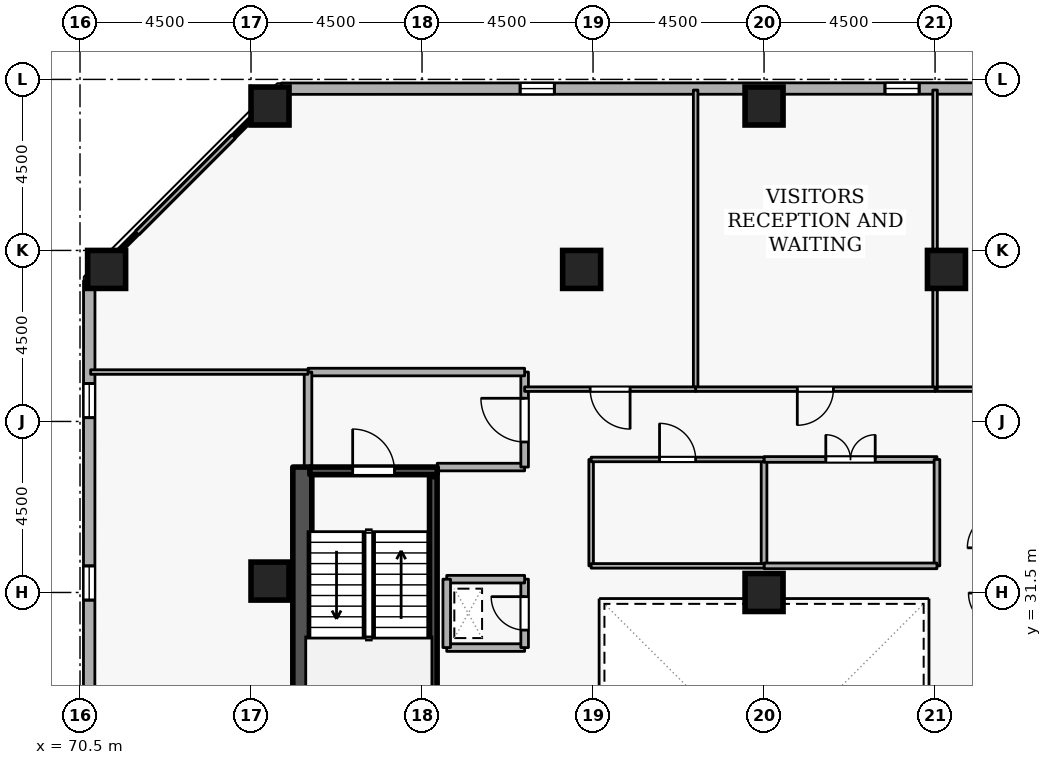
"""IFC4 building model, lengths in metres.
Left out: names, types, materials, properties, quantities, classifications, styles, units other than length and angle.
Written with IfcOpenShell. Run it as: python <this file> out.ifc"""

import sys

from ifc_helpers import new_model, si_unit, direction, frame, frame_2d, origin, origin_2d, place, context, subcontext, project, spatial, rectangle, extrude, element, fill, save


model = new_model("IFC4")
c1 = context("Model", 3, precision=1e-05, world=origin(), true_north=direction((0.0, 1.0)))
c2 = subcontext(c1, "Body", "Model", "MODEL_VIEW")
j1 = project(units=[si_unit("LENGTHUNIT", "METRE"), si_unit("PLANEANGLEUNIT", "RADIAN")], contexts=[c1])
p1 = place(None, origin())
s1 = spatial("IfcSite", under=j1, at=p1, CompositionType="ELEMENT")
p2 = place(p1, origin())
s2 = spatial("IfcBuilding", under=s1, at=p2, CompositionType="ELEMENT")
p3 = place(p2, frame((0.0, 0.0, 243.9)))
s3 = spatial("IfcBuildingStorey", under=s2, at=p3, CompositionType="ELEMENT", Elevation=243.9)
p4 = place(p3, frame((76.35, 19.2, 0.0), z_axis=(0.0, 0.0, 1.0), x_axis=(0.0, 1.0, 0.0)))
e1 = element("IfcWall", 1, at=p4, inside=s3, PredefinedType="SHEAR", context=c2, shape_type="SweptSolid", body=[
    extrude(rectangle(XDim=15.6, YDim=0.5, at=frame_2d((7.8, 0.0))), origin(), (0.0, 0.0, 1.0), 3.6),
])
for number, where, z_axis, x_axis in (
    (2, (88.5, 44.3, 0.0), (0.0, 0.0, 1.0), (1.0, 0.0, 0.0)),
    (3, (75.5, 44.3, 0.0), (0.0, 0.0, 1.0), (1.0, 0.0, 0.0)),
    (4, (71.2, 40.0, 0.0), (0.0, 0.0, 1.0), (1.0, 0.0, 0.0)),
    (5, (93.3, 40.0, 0.0), (0.0, 0.0, 1.0), (1.0, 0.0, 0.0)),
    (6, (83.7, 40.0, 0.0), (0.0, 0.0, 1.0), (1.0, 0.0, 0.0)),
    (7, (75.5, 31.8, 0.0), (0.0, 0.0, 1.0), (1.0, 0.0, 0.0)),
    (8, (88.5, 31.5, 0.0), (0.0, 0.0, 1.0), (1.0, 0.0, 0.0)),
):
    element("IfcColumn", number, at=place(p3, frame(where, z_axis=z_axis, x_axis=x_axis)), inside=s3, PredefinedType="COLUMN", context=c2, shape_type="SweptSolid", body=[
        extrude(rectangle(XDim=1.0, YDim=1.0, at=origin_2d()), origin(), (0.0, 0.0, 1.0), 3.6),
    ])
p5 = place(p3, frame((109.681, 44.765, 0.0), z_axis=(0.0, 0.0, 1.0), x_axis=(-0.999999969988, -0.000244999128, 0.0)))
e9 = element("IfcWall", 9, at=p5, inside=s3, PredefinedType="STANDARD", context=c2, shape_type="SweptSolid", body=[
    extrude(rectangle(XDim=33.881, YDim=0.3, at=frame_2d((16.94, 0.0))), origin(), (0.0, 0.0, 1.0), 2.7),
])
p6 = place(p5, frame((2.7, 0.0, 0.72)))
e10 = element("IfcOpeningElement", 10, at=p6, cuts=e9, PredefinedType="OPENING", context=c2, shape_type="SweptSolid", body=[
    extrude(rectangle(XDim=0.9, YDim=1.75, at=frame_2d((0.45, 0.875))), frame((0.0, 0.16, 0.0), z_axis=(0.0, -1.0, 0.0), x_axis=(1.0, 0.0, 0.0)), (0.0, 0.0, 1.0), 0.32),
])
p7 = place(p5, frame((12.3, 0.0, 0.72)))
e11 = element("IfcOpeningElement", 11, at=p7, cuts=e9, PredefinedType="OPENING", context=c2, shape_type="SweptSolid", body=[
    extrude(rectangle(XDim=0.9, YDim=1.75, at=frame_2d((0.45, 0.875))), frame((0.0, 0.16, 0.0), z_axis=(0.0, -1.0, 0.0), x_axis=(1.0, 0.0, 0.0)), (0.0, 0.0, 1.0), 0.32),
])
p8 = place(p5, frame((17.1, 0.0, 0.72)))
e12 = element("IfcOpeningElement", 12, at=p8, cuts=e9, PredefinedType="OPENING", context=c2, shape_type="SweptSolid", body=[
    extrude(rectangle(XDim=0.9, YDim=1.75, at=frame_2d((0.45, 0.875))), frame((0.0, 0.16, 0.0), z_axis=(0.0, -1.0, 0.0), x_axis=(1.0, 0.0, 0.0)), (0.0, 0.0, 1.0), 0.32),
])
p9 = place(p5, frame((26.7, 0.0, 0.72)))
e13 = element("IfcOpeningElement", 13, at=p9, cuts=e9, PredefinedType="OPENING", context=c2, shape_type="SweptSolid", body=[
    extrude(rectangle(XDim=0.9, YDim=1.75, at=frame_2d((0.45, 0.875))), frame((0.0, 0.16, 0.0), z_axis=(0.0, -1.0, 0.0), x_axis=(1.0, 0.0, 0.0)), (0.0, 0.0, 1.0), 0.32),
])
p10 = place(p3, frame((70.744, 39.699, 0.0), z_axis=(0.0, 0.0, 1.0), x_axis=(-0.000244999128, -0.999999969988, 0.0)))
e14 = element("IfcWall", 14, at=p10, inside=s3, PredefinedType="STANDARD", context=c2, shape_type="SweptSolid", body=[
    extrude(rectangle(XDim=33.881, YDim=0.3, at=frame_2d((16.94, 0.0))), origin(), (0.0, 0.0, 1.0), 2.7),
])
p11 = place(p10, frame((2.7, 0.0, 0.72)))
e15 = element("IfcOpeningElement", 15, at=p11, cuts=e14, PredefinedType="OPENING", context=c2, shape_type="SweptSolid", body=[
    extrude(rectangle(XDim=0.9, YDim=1.75, at=frame_2d((0.45, 0.875))), frame((0.0, 0.16, 0.0), z_axis=(0.0, -1.0, 0.0), x_axis=(1.0, 0.0, 0.0)), (0.0, 0.0, 1.0), 0.32),
])
p12 = place(p10, frame((7.5, 0.0, 0.72)))
e16 = element("IfcOpeningElement", 16, at=p12, cuts=e14, PredefinedType="OPENING", context=c2, shape_type="SweptSolid", body=[
    extrude(rectangle(XDim=0.9, YDim=1.75, at=frame_2d((0.45, 0.875))), frame((0.0, 0.16, 0.0), z_axis=(0.0, -1.0, 0.0), x_axis=(1.0, 0.0, 0.0)), (0.0, 0.0, 1.0), 0.32),
])
p13 = place(p10, frame((17.1, 0.0, 0.72)))
e17 = element("IfcOpeningElement", 17, at=p13, cuts=e14, PredefinedType="OPENING", context=c2, shape_type="SweptSolid", body=[
    extrude(rectangle(XDim=0.9, YDim=1.75, at=frame_2d((0.45, 0.875))), frame((0.0, 0.16, 0.0), z_axis=(0.0, -1.0, 0.0), x_axis=(1.0, 0.0, 0.0)), (0.0, 0.0, 1.0), 0.32),
])
p14 = place(p3, frame((76.55, 34.7, 0.0), z_axis=(0.0, 0.0, 1.0), x_axis=(1.0, 0.0, 0.0)))
e18 = element("IfcWall", 18, at=p14, inside=s3, PredefinedType="SHEAR", context=c2, shape_type="SweptSolid", body=[
    extrude(rectangle(XDim=3.35, YDim=0.2, at=frame_2d((1.675, 0.0))), origin(), (0.0, 0.0, 1.0), 3.6),
])
p15 = place(p14, frame((1.125, 0.0, 0.0)))
e19 = element("IfcOpeningElement", 19, at=p15, cuts=e18, PredefinedType="OPENING", context=c2, shape_type="SweptSolid", body=[
    extrude(rectangle(XDim=1.1, YDim=2.1, at=frame_2d((0.55, 1.05))), frame((0.0, 0.11, 0.0), z_axis=(0.0, -1.0, 0.0), x_axis=(1.0, 0.0, 0.0)), (0.0, 0.0, 1.0), 0.22),
])
p16 = place(p3, frame((79.797, 27.45, 0.0), z_axis=(0.0, 0.0, 1.0), x_axis=(0.0, 1.0, 0.0)))
e20 = element("IfcWall", 20, at=p16, inside=s3, PredefinedType="SHEAR", context=c2, shape_type="SweptSolid", body=[
    extrude(rectangle(XDim=7.1, YDim=0.2, at=frame_2d((3.55, 0.0))), origin(), (0.0, 0.0, 1.0), 3.6),
])
p17 = place(p3, frame((79.9, 34.8, 0.0), z_axis=(0.0, 0.0, 1.0), x_axis=(1.0, 0.0, 0.0)))
e21 = element("IfcWall", 21, at=p17, inside=s3, PredefinedType="STANDARD", context=c2, shape_type="SweptSolid", body=[
    extrude(rectangle(XDim=2.3, YDim=0.2, at=frame_2d((1.15, 0.0))), origin(), (0.0, 0.0, 1.0), 2.545),
])
p18 = place(p3, frame((82.2, 34.8, 0.0), z_axis=(0.0, 0.0, 1.0), x_axis=(0.0, 1.0, 0.0)))
e22 = element("IfcWall", 22, at=p18, inside=s3, PredefinedType="STANDARD", context=c2, shape_type="SweptSolid", body=[
    extrude(rectangle(XDim=2.5, YDim=0.2, at=frame_2d((1.25, 0.0))), origin(), (0.0, 0.0, 1.0), 3.34),
])
p19 = place(p18, frame((0.66, 0.0, 0.0)))
e23 = element("IfcOpeningElement", 23, at=p19, cuts=e22, PredefinedType="OPENING", context=c2, shape_type="SweptSolid", body=[
    extrude(rectangle(XDim=1.15, YDim=2.1, at=frame_2d((0.575, 1.05))), frame((0.0, 0.11, 0.0), z_axis=(0.0, -1.0, 0.0), x_axis=(1.0, 0.0, 0.0)), (0.0, 0.0, 1.0), 0.22),
])
p20 = place(p3, frame((82.2, 37.3, 0.0), z_axis=(0.0, 0.0, 1.0), x_axis=(-1.0, 0.0, 0.0)))
e24 = element("IfcWall", 24, at=p20, inside=s3, PredefinedType="STANDARD", context=c2, shape_type="SweptSolid", body=[
    extrude(rectangle(XDim=5.7, YDim=0.2, at=frame_2d((2.85, 0.0))), origin(), (0.0, 0.0, 1.0), 3.34),
])
p21 = place(p3, frame((76.5, 37.3, 0.0), z_axis=(0.0, 0.0, 1.0), x_axis=(0.0, -1.0, 0.0)))
e25 = element("IfcWall", 25, at=p21, inside=s3, PredefinedType="STANDARD", context=c2, shape_type="SweptSolid", body=[
    extrude(rectangle(XDim=2.5, YDim=0.2, at=frame_2d((1.25, 0.0))), origin(), (0.0, 0.0, 1.0), 3.34),
])
p22 = place(p3, frame((80.15, 30.05, 0.0), z_axis=(0.0, 0.0, 1.0), x_axis=(1.0, 0.0, 0.0)))
e26 = element("IfcWall", 26, at=p22, inside=s3, PredefinedType="STANDARD", context=c2, shape_type="SweptSolid", body=[
    extrude(rectangle(XDim=2.05, YDim=0.2, at=frame_2d((1.025, 0.0))), origin(), (0.0, 0.0, 1.0), 3.34),
])
p23 = place(p3, frame((82.2, 30.05, 0.0), z_axis=(0.0, 0.0, 1.0), x_axis=(0.0, 1.0, 0.0)))
e27 = element("IfcWall", 27, at=p23, inside=s3, PredefinedType="STANDARD", context=c2, shape_type="SweptSolid", body=[
    extrude(rectangle(XDim=1.8, YDim=0.2, at=frame_2d((0.9, 0.0))), origin(), (0.0, 0.0, 1.0), 3.34),
])
p24 = place(p23, frame((0.46, 0.0, 0.0)))
e28 = element("IfcOpeningElement", 28, at=p24, cuts=e27, PredefinedType="OPENING", context=c2, shape_type="SweptSolid", body=[
    extrude(rectangle(XDim=0.88, YDim=2.04, at=frame_2d((0.44, 1.02))), frame((0.0, 0.11, 0.0), z_axis=(0.0, -1.0, 0.0), x_axis=(1.0, 0.0, 0.0)), (0.0, 0.0, 1.0), 0.22),
])
p25 = place(p3, frame((82.2, 31.85, 0.0), z_axis=(0.0, 0.0, 1.0), x_axis=(-1.0, 0.0, 0.0)))
e29 = element("IfcWall", 29, at=p25, inside=s3, PredefinedType="STANDARD", context=c2, shape_type="SweptSolid", body=[
    extrude(rectangle(XDim=2.05, YDim=0.2, at=frame_2d((1.025, 0.0))), origin(), (0.0, 0.0, 1.0), 3.34),
])
p26 = place(p3, frame((80.15, 31.85, 0.0), z_axis=(0.0, 0.0, 1.0), x_axis=(0.0, -1.0, 0.0)))
e30 = element("IfcWall", 30, at=p26, inside=s3, PredefinedType="STANDARD", context=c2, shape_type="SweptSolid", body=[
    extrude(rectangle(XDim=1.8, YDim=0.2, at=frame_2d((0.9, 0.0))), origin(), (0.0, 0.0, 1.0), 3.34),
])
p27 = place(p3, frame((100.7, 36.85, 0.0), z_axis=(0.0, 0.0, 1.0), x_axis=(-1.0, 0.0, 0.0)))
e31 = element("IfcWall", 31, at=p27, inside=s3, PredefinedType="PARTITIONING", context=c2, shape_type="SweptSolid", body=[
    extrude(rectangle(XDim=7.7, YDim=0.12, at=frame_2d((3.85, 0.0))), origin(), (0.0, 0.0, 1.0), 3.34),
])
p28 = place(p27, frame((3.325, 0.0, 0.0)))
e32 = element("IfcOpeningElement", 32, at=p28, cuts=e31, PredefinedType="OPENING", context=c2, shape_type="SweptSolid", body=[
    extrude(rectangle(XDim=1.05, YDim=2.1, at=frame_2d((0.525, 1.05))), frame((0.0, 0.07, 0.0), z_axis=(0.0, -1.0, 0.0), x_axis=(1.0, 0.0, 0.0)), (0.0, 0.0, 1.0), 0.14),
])
for number, where, z_axis, x_axis in (
    (33, (93.0, 36.85, 0.0), (0.0, 0.0, 1.0), (0.0, 1.0, 0.0)),
    (34, (86.7, 36.85, 0.0), (0.0, 0.0, 1.0), (0.0, 1.0, 0.0)),
):
    element("IfcWall", number, at=place(p3, frame(where, z_axis=z_axis, x_axis=x_axis)), inside=s3, PredefinedType="PARTITIONING", context=c2, shape_type="SweptSolid", body=[
        extrude(rectangle(XDim=7.87, YDim=0.12, at=frame_2d((3.935, 0.0))), origin(), (0.0, 0.0, 1.0), 3.34),
    ])
p29 = place(p3, frame((93.0, 36.85, 0.0), z_axis=(0.0, 0.0, 1.0), x_axis=(-1.0, 0.0, 0.0)))
e35 = element("IfcWall", 35, at=p29, inside=s3, PredefinedType="PARTITIONING", context=c2, shape_type="SweptSolid", body=[
    extrude(rectangle(XDim=6.3, YDim=0.12, at=frame_2d((3.15, 0.0))), origin(), (0.0, 0.0, 1.0), 3.34),
])
p30 = place(p29, frame((2.675, 0.0, 0.0)))
e36 = element("IfcOpeningElement", 36, at=p30, cuts=e35, PredefinedType="OPENING", context=c2, shape_type="SweptSolid", body=[
    extrude(rectangle(XDim=0.95, YDim=2.1, at=frame_2d((0.475, 1.05))), frame((0.0, 0.07, 0.0), z_axis=(0.0, -1.0, 0.0), x_axis=(1.0, 0.0, 0.0)), (0.0, 0.0, 1.0), 0.14),
])
p31 = place(p3, frame((76.5, 37.3, 0.0), z_axis=(0.0, 0.0, 1.0), x_axis=(-1.0, 0.0, 0.0)))
e37 = element("IfcWall", 37, at=p31, inside=s3, PredefinedType="PARTITIONING", context=c2, shape_type="SweptSolid", body=[
    extrude(rectangle(XDim=5.72, YDim=0.12, at=frame_2d((2.86, 0.0))), origin(), (0.0, 0.0, 1.0), 3.34),
])
p32 = place(p3, frame((70.78, 39.733, 0.0), z_axis=(0.0, 0.0, 1.0), x_axis=(0.707106781187, 0.707106781187, 0.0)))
e38 = element("IfcWall", 38, at=p32, inside=s3, PredefinedType="PARTITIONING", context=c2, shape_type="SweptSolid", body=[
    extrude(rectangle(XDim=7.052, YDim=0.12, at=frame_2d((3.526, 0.0))), origin(), (0.0, 0.0, 1.0), 3.34),
])
p33 = place(p3, frame((86.7, 36.85, 0.0), z_axis=(0.0, 0.0, 1.0), x_axis=(-1.0, 0.0, 0.0)))
e39 = element("IfcWall", 39, at=p33, inside=s3, PredefinedType="PARTITIONING", context=c2, shape_type="SweptSolid", body=[
    extrude(rectangle(XDim=4.5, YDim=0.12, at=frame_2d((2.25, 0.0))), origin(), (0.0, 0.0, 1.0), 3.34),
])
p34 = place(p33, frame((1.725, 0.0, 0.0)))
e40 = element("IfcOpeningElement", 40, at=p34, cuts=e39, PredefinedType="OPENING", context=c2, shape_type="SweptSolid", body=[
    extrude(rectangle(XDim=1.05, YDim=2.1, at=frame_2d((0.525, 1.05))), frame((0.0, 0.07, 0.0), z_axis=(0.0, -1.0, 0.0), x_axis=(1.0, 0.0, 0.0)), (0.0, 0.0, 1.0), 0.14),
])
p35 = place(p3, frame((88.5, 32.2, 0.0), z_axis=(0.0, 0.0, 1.0), x_axis=(0.0, 1.0, 0.0)))
e41 = element("IfcWall", 41, at=p35, inside=s3, PredefinedType="PARTITIONING", context=c2, shape_type="SweptSolid", body=[
    extrude(rectangle(XDim=2.8, YDim=0.15, at=frame_2d((1.4, 0.0))), origin(), (0.0, 0.0, 1.0), 2.878),
])
p36 = place(p3, frame((88.5, 35.0, 0.0), z_axis=(0.0, 0.0, 1.0), x_axis=(1.0, 0.0, 0.0)))
e42 = element("IfcWall", 42, at=p36, inside=s3, PredefinedType="PARTITIONING", context=c2, shape_type="SweptSolid", body=[
    extrude(rectangle(XDim=4.55, YDim=0.15, at=frame_2d((2.275, 0.0))), origin(), (0.0, 0.0, 1.0), 3.34),
])
p37 = place(p36, frame((1.625, 0.0, 0.0)))
e43 = element("IfcOpeningElement", 43, at=p37, cuts=e42, PredefinedType="OPENING", context=c2, shape_type="SweptSolid", body=[
    extrude(rectangle(XDim=1.3, YDim=2.12, at=frame_2d((0.65, 1.06))), frame((0.0, 0.085, 0.0), z_axis=(0.0, -1.0, 0.0), x_axis=(1.0, 0.0, 0.0)), (0.0, 0.0, 1.0), 0.17),
])
p38 = place(p3, frame((93.05, 35.0, 0.0), z_axis=(0.0, 0.0, 1.0), x_axis=(0.0, -1.0, 0.0)))
e44 = element("IfcWall", 44, at=p38, inside=s3, PredefinedType="PARTITIONING", context=c2, shape_type="SweptSolid", body=[
    extrude(rectangle(XDim=2.8, YDim=0.15, at=frame_2d((1.4, 0.0))), origin(), (0.0, 0.0, 1.0), 3.34),
])
p39 = place(p3, frame((93.05, 32.2, 0.0), z_axis=(0.0, 0.0, 1.0), x_axis=(-1.0, 0.0, 0.0)))
e45 = element("IfcWall", 45, at=p39, inside=s3, PredefinedType="PARTITIONING", context=c2, shape_type="SweptSolid", body=[
    extrude(rectangle(XDim=4.55, YDim=0.15, at=frame_2d((2.275, 0.0))), origin(), (0.0, 0.0, 1.0), 3.34),
])
p40 = place(p3, frame((83.95, 32.2, 0.0), z_axis=(0.0, 0.0, 1.0), x_axis=(0.0, 1.0, 0.0)))
e46 = element("IfcWall", 46, at=p40, inside=s3, PredefinedType="PARTITIONING", context=c2, shape_type="SweptSolid", body=[
    extrude(rectangle(XDim=2.8, YDim=0.12, at=frame_2d((1.4, 0.0))), origin(), (0.0, 0.0, 1.0), 3.34),
])
p41 = place(p3, frame((83.95, 35.0, 0.0), z_axis=(0.0, 0.0, 1.0), x_axis=(1.0, 0.0, 0.0)))
e47 = element("IfcWall", 47, at=p41, inside=s3, PredefinedType="PARTITIONING", context=c2, shape_type="SweptSolid", body=[
    extrude(rectangle(XDim=4.55, YDim=0.12, at=frame_2d((2.275, 0.0))), origin(), (0.0, 0.0, 1.0), 3.34),
])
p42 = place(p41, frame((1.8, 0.0, 0.0)))
e48 = element("IfcOpeningElement", 48, at=p42, cuts=e47, PredefinedType="OPENING", context=c2, shape_type="SweptSolid", body=[
    extrude(rectangle(XDim=0.95, YDim=2.1, at=frame_2d((0.475, 1.05))), frame((0.0, 0.07, 0.0), z_axis=(0.0, -1.0, 0.0), x_axis=(1.0, 0.0, 0.0)), (0.0, 0.0, 1.0), 0.14),
])
p43 = place(p3, frame((88.5, 32.2, 0.0), z_axis=(0.0, 0.0, 1.0), x_axis=(-1.0, 0.0, 0.0)))
e49 = element("IfcWall", 49, at=p43, inside=s3, PredefinedType="PARTITIONING", context=c2, shape_type="SweptSolid", body=[
    extrude(rectangle(XDim=4.55, YDim=0.12, at=frame_2d((2.275, 0.0))), origin(), (0.0, 0.0, 1.0), 3.34),
])
p44 = place(p8, origin())
e50 = element("IfcWindow", 50, at=p44, inside=s3, PartitioningType="SINGLE_PANEL", PredefinedType="WINDOW", context=c2, shape_type="SweptSolid", body=[
    extrude(rectangle(XDim=0.9, YDim=1.75, at=frame_2d((0.45, 0.875))), frame((0.0, 0.03, 0.0), z_axis=(0.0, -1.0, 0.0), x_axis=(1.0, 0.0, 0.0)), (0.0, 0.0, 1.0), 0.06),
])
fill(e12, e50)
p45 = place(p9, origin())
e51 = element("IfcWindow", 51, at=p45, inside=s3, PartitioningType="SINGLE_PANEL", PredefinedType="WINDOW", context=c2, shape_type="SweptSolid", body=[
    extrude(rectangle(XDim=0.9, YDim=1.75, at=frame_2d((0.45, 0.875))), frame((0.0, 0.03, 0.0), z_axis=(0.0, -1.0, 0.0), x_axis=(1.0, 0.0, 0.0)), (0.0, 0.0, 1.0), 0.06),
])
fill(e13, e51)
p46 = place(p11, origin())
e52 = element("IfcWindow", 52, at=p46, inside=s3, PartitioningType="SINGLE_PANEL", PredefinedType="WINDOW", context=c2, shape_type="SweptSolid", body=[
    extrude(rectangle(XDim=0.9, YDim=1.75, at=frame_2d((0.45, 0.875))), frame((0.0, 0.03, 0.0), z_axis=(0.0, -1.0, 0.0), x_axis=(1.0, 0.0, 0.0)), (0.0, 0.0, 1.0), 0.06),
])
fill(e15, e52)
p47 = place(p12, origin())
e53 = element("IfcWindow", 53, at=p47, inside=s3, PartitioningType="SINGLE_PANEL", PredefinedType="WINDOW", context=c2, shape_type="SweptSolid", body=[
    extrude(rectangle(XDim=0.9, YDim=1.75, at=frame_2d((0.45, 0.875))), frame((0.0, 0.03, 0.0), z_axis=(0.0, -1.0, 0.0), x_axis=(1.0, 0.0, 0.0)), (0.0, 0.0, 1.0), 0.06),
])
fill(e16, e53)
p48 = place(p15, origin())
e54 = element("IfcDoor", 54, at=p48, inside=s3, OperationType="SINGLE_SWING_LEFT", PredefinedType="DOOR", context=c2, shape_type="SweptSolid", body=[
    extrude(rectangle(XDim=1.1, YDim=2.1, at=frame_2d((0.55, 1.05))), frame((0.0, 0.025, 0.0), z_axis=(0.0, -1.0, 0.0), x_axis=(1.0, 0.0, 0.0)), (0.0, 0.0, 1.0), 0.05),
])
fill(e19, e54)
p49 = place(p19, origin())
e55 = element("IfcDoor", 55, at=p49, inside=s3, OperationType="SINGLE_SWING_RIGHT", PredefinedType="DOOR", context=c2, shape_type="SweptSolid", body=[
    extrude(rectangle(XDim=1.15, YDim=2.1, at=frame_2d((0.575, 1.05))), frame((0.0, 0.025, 0.0), z_axis=(0.0, -1.0, 0.0), x_axis=(1.0, 0.0, 0.0)), (0.0, 0.0, 1.0), 0.05),
])
fill(e23, e55)
p50 = place(p24, origin())
e56 = element("IfcDoor", 56, at=p50, inside=s3, OperationType="SINGLE_SWING_RIGHT", PredefinedType="DOOR", context=c2, shape_type="SweptSolid", body=[
    extrude(rectangle(XDim=0.88, YDim=2.04, at=frame_2d((0.44, 1.02))), frame((0.0, 0.025, 0.0), z_axis=(0.0, -1.0, 0.0), x_axis=(1.0, 0.0, 0.0)), (0.0, 0.0, 1.0), 0.05),
])
fill(e28, e56)
p51 = place(p30, origin())
e57 = element("IfcDoor", 57, at=p51, inside=s3, OperationType="SINGLE_SWING_RIGHT", PredefinedType="DOOR", context=c2, shape_type="SweptSolid", body=[
    extrude(rectangle(XDim=0.95, YDim=2.1, at=frame_2d((0.475, 1.05))), frame((0.0, 0.025, 0.0), z_axis=(0.0, -1.0, 0.0), x_axis=(1.0, 0.0, 0.0)), (0.0, 0.0, 1.0), 0.05),
])
fill(e36, e57)
p52 = place(p34, origin())
e58 = element("IfcDoor", 58, at=p52, inside=s3, OperationType="SINGLE_SWING_LEFT", PredefinedType="DOOR", context=c2, shape_type="SweptSolid", body=[
    extrude(rectangle(XDim=1.05, YDim=2.1, at=frame_2d((0.525, 1.05))), frame((0.0, 0.025, 0.0), z_axis=(0.0, -1.0, 0.0), x_axis=(1.0, 0.0, 0.0)), (0.0, 0.0, 1.0), 0.05),
])
fill(e40, e58)
p53 = place(p37, origin())
e59 = element("IfcDoor", 59, at=p53, inside=s3, OperationType="DOUBLE_DOOR_SINGLE_SWING", PredefinedType="DOOR", context=c2, shape_type="SweptSolid", body=[
    extrude(rectangle(XDim=1.3, YDim=2.12, at=frame_2d((0.65, 1.06))), frame((0.0, 0.025, 0.0), z_axis=(0.0, -1.0, 0.0), x_axis=(1.0, 0.0, 0.0)), (0.0, 0.0, 1.0), 0.05),
])
fill(e43, e59)
p54 = place(p42, origin())
e60 = element("IfcDoor", 60, at=p54, inside=s3, OperationType="SINGLE_SWING_LEFT", PredefinedType="DOOR", context=c2, shape_type="SweptSolid", body=[
    extrude(rectangle(XDim=0.95, YDim=2.1, at=frame_2d((0.475, 1.05))), frame((0.0, 0.025, 0.0), z_axis=(0.0, -1.0, 0.0), x_axis=(1.0, 0.0, 0.0)), (0.0, 0.0, 1.0), 0.05),
])
fill(e48, e60)
save(model, sys.argv[1])
